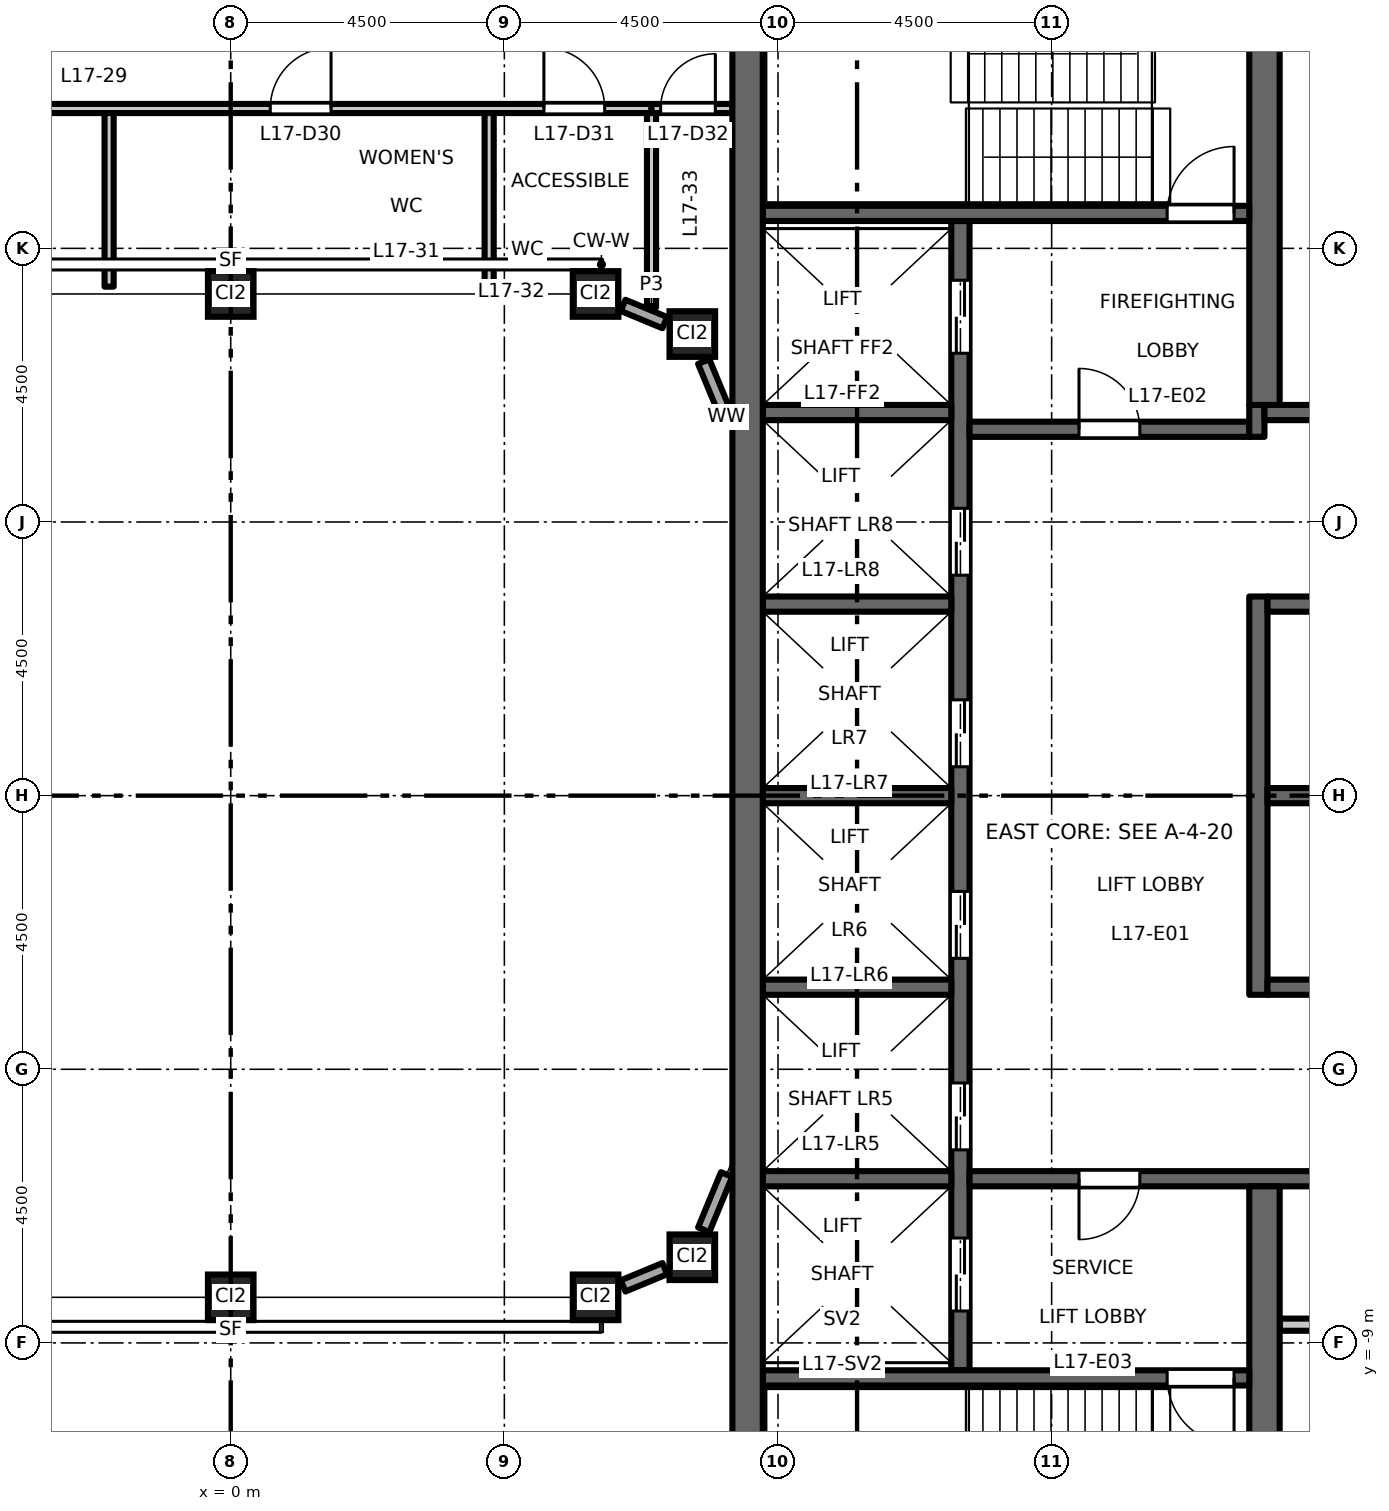
"""IFC4 building model, lengths in metres.
Left out: names, types, materials, properties, quantities, classifications, styles, units other than length and angle.
Written with IfcOpenShell. Run it as: python <this file> out.ifc"""

import sys

from ifc_helpers import new_model, si_unit, direction, frame, frame_2d, origin, origin_2d, place, context, subcontext, project, spatial, rectangle, hollow_rectangle, extrude, element, fill, save


model = new_model("IFC4")
c1 = context("Model", 3, precision=1e-05, world=origin(), true_north=direction((0.0, 1.0)))
c2 = subcontext(c1, "Body", "Model", "MODEL_VIEW")
j1 = project(units=[si_unit("LENGTHUNIT", "METRE"), si_unit("PLANEANGLEUNIT", "RADIAN")], contexts=[c1])
p1 = place(None, origin())
s1 = spatial("IfcSite", under=j1, at=p1, CompositionType="ELEMENT")
p2 = place(p1, origin())
s2 = spatial("IfcBuilding", under=s1, at=p2, CompositionType="ELEMENT")
p3 = place(p2, frame((0.0, 0.0, 80.7)))
s3 = spatial("IfcBuildingStorey", under=s2, at=p3, CompositionType="ELEMENT", Elevation=80.7)
for number, where, z_axis, x_axis in (
    (1, (0.0, -8.25, 0.0), (0.0, 0.0, 1.0), (1.0, 0.0, 0.0)),
    (2, (6.0, -8.25, 0.0), (0.0, 0.0, 1.0), (1.0, 0.0, 0.0)),
    (3, (7.591, -7.591, 0.0), (0.0, 0.0, 1.0), (1.0, 0.0, 0.0)),
    (4, (0.0, 8.25, 0.0), (0.0, 0.0, 1.0), (1.0, 0.0, 0.0)),
    (5, (6.0, 8.25, 0.0), (0.0, 0.0, 1.0), (1.0, 0.0, 0.0)),
    (6, (7.591, 7.591, 0.0), (0.0, 0.0, 1.0), (1.0, 0.0, 0.0)),
):
    element("IfcColumn", number, at=place(p3, frame(where, z_axis=z_axis, x_axis=x_axis)), inside=s3, PredefinedType="COLUMN", context=c2, shape_type="SweptSolid", body=[
        extrude(hollow_rectangle(XDim=0.75, YDim=0.75, WallThickness=0.045, at=origin_2d()), origin(), (0.0, 0.0, 1.0), 4.5),
    ])
p4 = place(p3, frame((12.0, -9.45, 0.0), z_axis=(0.0, 0.0, 1.0), x_axis=(0.0, 1.0, 0.0)))
e7 = element("IfcWall", 7, at=p4, inside=s3, PredefinedType="SHEAR", context=c2, shape_type="SweptSolid", body=[
    extrude(rectangle(XDim=18.9, YDim=0.3, at=frame_2d((9.45, 0.0))), origin(), (0.0, 0.0, 1.0), 4.35),
])
p5 = place(p4, frame((3.625, 0.0, 0.0)))
e8 = element("IfcOpeningElement", 8, at=p5, cuts=e7, PredefinedType="OPENING", context=c2, shape_type="SweptSolid", body=[
    extrude(rectangle(XDim=1.1, YDim=2.1, at=frame_2d((0.55, 1.05))), frame((0.0, 0.16, 0.0), z_axis=(0.0, -1.0, 0.0), x_axis=(1.0, 0.0, 0.0)), (0.0, 0.0, 1.0), 0.32),
])
p6 = place(p4, frame((6.775, 0.0, 0.0)))
e9 = element("IfcOpeningElement", 9, at=p6, cuts=e7, PredefinedType="OPENING", context=c2, shape_type="SweptSolid", body=[
    extrude(rectangle(XDim=1.1, YDim=2.1, at=frame_2d((0.55, 1.05))), frame((0.0, 0.16, 0.0), z_axis=(0.0, -1.0, 0.0), x_axis=(1.0, 0.0, 0.0)), (0.0, 0.0, 1.0), 0.32),
])
p7 = place(p4, frame((9.925, 0.0, 0.0)))
e10 = element("IfcOpeningElement", 10, at=p7, cuts=e7, PredefinedType="OPENING", context=c2, shape_type="SweptSolid", body=[
    extrude(rectangle(XDim=1.1, YDim=2.1, at=frame_2d((0.55, 1.05))), frame((0.0, 0.16, 0.0), z_axis=(0.0, -1.0, 0.0), x_axis=(1.0, 0.0, 0.0)), (0.0, 0.0, 1.0), 0.32),
])
p8 = place(p4, frame((13.075, 0.0, 0.0)))
e11 = element("IfcOpeningElement", 11, at=p8, cuts=e7, PredefinedType="OPENING", context=c2, shape_type="SweptSolid", body=[
    extrude(rectangle(XDim=1.1, YDim=2.1, at=frame_2d((0.55, 1.05))), frame((0.0, 0.16, 0.0), z_axis=(0.0, -1.0, 0.0), x_axis=(1.0, 0.0, 0.0)), (0.0, 0.0, 1.0), 0.32),
])
p9 = place(p4, frame((16.725, 0.0, 0.0)))
e12 = element("IfcOpeningElement", 12, at=p9, cuts=e7, PredefinedType="OPENING", context=c2, shape_type="SweptSolid", body=[
    extrude(rectangle(XDim=1.2, YDim=2.1, at=frame_2d((0.6, 1.05))), frame((0.0, 0.16, 0.0), z_axis=(0.0, -1.0, 0.0), x_axis=(1.0, 0.0, 0.0)), (0.0, 0.0, 1.0), 0.32),
])
p10 = place(p4, frame((0.975, 0.0, 0.0)))
e13 = element("IfcOpeningElement", 13, at=p10, cuts=e7, PredefinedType="OPENING", context=c2, shape_type="SweptSolid", body=[
    extrude(rectangle(XDim=1.2, YDim=2.1, at=frame_2d((0.6, 1.05))), frame((0.0, 0.16, 0.0), z_axis=(0.0, -1.0, 0.0), x_axis=(1.0, 0.0, 0.0)), (0.0, 0.0, 1.0), 0.32),
])
p11 = place(p3, frame((12.15, 6.025, 0.0), z_axis=(0.0, 0.0, 1.0), x_axis=(1.0, 0.0, 0.0)))
e14 = element("IfcWall", 14, at=p11, inside=s3, PredefinedType="SHEAR", context=c2, shape_type="SweptSolid", body=[
    extrude(rectangle(XDim=4.6, YDim=0.25, at=frame_2d((2.3, 0.0))), origin(), (0.0, 0.0, 1.0), 4.35),
])
p12 = place(p11, frame((1.8, 0.0, 0.0)))
e15 = element("IfcOpeningElement", 15, at=p12, cuts=e14, PredefinedType="OPENING", context=c2, shape_type="SweptSolid", body=[
    extrude(rectangle(XDim=1.0, YDim=2.1, at=frame_2d((0.5, 1.05))), frame((0.0, 0.135, 0.0), z_axis=(0.0, -1.0, 0.0), x_axis=(1.0, 0.0, 0.0)), (0.0, 0.0, 1.0), 0.27),
])
p13 = place(p3, frame((16.875, 5.9, 0.0), z_axis=(0.0, 0.0, 1.0), x_axis=(0.0, 1.0, 0.0)))
e16 = element("IfcWall", 16, at=p13, inside=s3, PredefinedType="SHEAR", context=c2, shape_type="SweptSolid", body=[
    extrude(rectangle(XDim=0.525, YDim=0.25, at=frame_2d((0.263, 0.0))), origin(), (0.0, 0.0, 1.0), 4.35),
])
p14 = place(p3, frame((17.0, 6.3, 0.0), z_axis=(0.0, 0.0, 1.0), x_axis=(1.0, 0.0, 0.0)))
e17 = element("IfcWall", 17, at=p14, inside=s3, PredefinedType="SHEAR", context=c2, shape_type="SweptSolid", body=[
    extrude(rectangle(XDim=4.25, YDim=0.25, at=frame_2d((2.125, 0.0))), origin(), (0.0, 0.0, 1.0), 4.35),
])
p15 = place(p3, frame((12.15, -6.3, 0.0), z_axis=(0.0, 0.0, 1.0), x_axis=(1.0, 0.0, 0.0)))
e18 = element("IfcWall", 18, at=p15, inside=s3, PredefinedType="SHEAR", context=c2, shape_type="SweptSolid", body=[
    extrude(rectangle(XDim=9.1, YDim=0.25, at=frame_2d((4.55, 0.0))), origin(), (0.0, 0.0, 1.0), 4.35),
])
p16 = place(p15, frame((1.8, 0.0, 0.0)))
e19 = element("IfcOpeningElement", 19, at=p16, cuts=e18, PredefinedType="OPENING", context=c2, shape_type="SweptSolid", body=[
    extrude(rectangle(XDim=1.0, YDim=2.1, at=frame_2d((0.5, 1.05))), frame((0.0, 0.135, 0.0), z_axis=(0.0, -1.0, 0.0), x_axis=(1.0, 0.0, 0.0)), (0.0, 0.0, 1.0), 0.27),
])
p17 = place(p15, frame((6.15, 0.0, 0.0)))
e20 = element("IfcOpeningElement", 20, at=p17, cuts=e18, PredefinedType="OPENING", context=c2, shape_type="SweptSolid", body=[
    extrude(rectangle(XDim=0.9, YDim=2.1, at=frame_2d((0.45, 1.05))), frame((0.0, 0.135, 0.0), z_axis=(0.0, -1.0, 0.0), x_axis=(1.0, 0.0, 0.0)), (0.0, 0.0, 1.0), 0.27),
])
p18 = place(p3, frame((17.25, -8.7, 0.0), z_axis=(0.0, 0.0, 1.0), x_axis=(1.0, 0.0, 0.0)))
e21 = element("IfcWall", 21, at=p18, inside=s3, PredefinedType="PARTITIONING", context=c2, shape_type="SweptSolid", body=[
    extrude(rectangle(XDim=4.0, YDim=0.2, at=frame_2d((2.0, 0.0))), origin(), (0.0, 0.0, 1.0), 4.35),
])
p19 = place(p3, frame((16.9, -3.275, 0.0), z_axis=(0.0, 0.0, 1.0), x_axis=(0.0, 1.0, 0.0)))
e22 = element("IfcWall", 22, at=p19, inside=s3, PredefinedType="SHEAR", context=c2, shape_type="SweptSolid", body=[
    extrude(rectangle(XDim=6.55, YDim=0.3, at=frame_2d((3.275, 0.0))), origin(), (0.0, 0.0, 1.0), 4.35),
])
for number, where, z_axis, x_axis in (
    (23, (17.05, 0.0, 0.0), (0.0, 0.0, 1.0), (1.0, 0.0, 0.0)),
    (24, (17.05, 3.15, 0.0), (0.0, 0.0, 1.0), (1.0, 0.0, 0.0)),
    (25, (17.05, -3.15, 0.0), (0.0, 0.0, 1.0), (1.0, 0.0, 0.0)),
):
    element("IfcWall", number, at=place(p3, frame(where, z_axis=z_axis, x_axis=x_axis)), inside=s3, PredefinedType="SHEAR", context=c2, shape_type="SweptSolid", body=[
        extrude(rectangle(XDim=4.2, YDim=0.25, at=frame_2d((2.1, 0.0))), origin(), (0.0, 0.0, 1.0), 4.35),
    ])
for number, where, z_axis, x_axis in (
    (26, (17.0, 6.425, 0.0), (0.0, 0.0, 1.0), (0.0, 1.0, 0.0)),
    (27, (17.0, -13.0, 0.0), (0.0, 0.0, 1.0), (0.0, 1.0, 0.0)),
):
    element("IfcWall", number, at=place(p3, frame(where, z_axis=z_axis, x_axis=x_axis)), inside=s3, PredefinedType="SHEAR", context=c2, shape_type="SweptSolid", body=[
        extrude(rectangle(XDim=6.575, YDim=0.5, at=frame_2d((3.288, 0.0))), origin(), (0.0, 0.0, 1.0), 4.35),
    ])
for number, where, z_axis, x_axis in (
    (28, (8.75, 0.0, 0.0), (0.0, 0.0, 1.0), (1.0, 0.0, 0.0)),
    (29, (8.75, 3.15, 0.0), (0.0, 0.0, 1.0), (1.0, 0.0, 0.0)),
    (30, (8.75, 6.3, 0.0), (0.0, 0.0, 1.0), (1.0, 0.0, 0.0)),
    (31, (8.75, -3.15, 0.0), (0.0, 0.0, 1.0), (1.0, 0.0, 0.0)),
    (32, (8.75, -6.3, 0.0), (0.0, 0.0, 1.0), (1.0, 0.0, 0.0)),
):
    element("IfcWall", number, at=place(p3, frame(where, z_axis=z_axis, x_axis=x_axis)), inside=s3, PredefinedType="SHEAR", context=c2, shape_type="SweptSolid", body=[
        extrude(rectangle(XDim=3.1, YDim=0.25, at=frame_2d((1.55, 0.0))), origin(), (0.0, 0.0, 1.0), 4.35),
    ])
p20 = place(p3, frame((8.75, 9.575, 0.0), z_axis=(0.0, 0.0, 1.0), x_axis=(1.0, 0.0, 0.0)))
e33 = element("IfcWall", 33, at=p20, inside=s3, PredefinedType="SHEAR", context=c2, shape_type="SweptSolid", body=[
    extrude(rectangle(XDim=8.0, YDim=0.25, at=frame_2d((4.0, 0.0))), origin(), (0.0, 0.0, 1.0), 4.35),
])
p21 = place(p20, frame((6.65, 0.0, 0.0)))
e34 = element("IfcOpeningElement", 34, at=p21, cuts=e33, PredefinedType="OPENING", context=c2, shape_type="SweptSolid", body=[
    extrude(rectangle(XDim=1.1, YDim=2.1, at=frame_2d((0.55, 1.05))), frame((0.0, 0.135, 0.0), z_axis=(0.0, -1.0, 0.0), x_axis=(1.0, 0.0, 0.0)), (0.0, 0.0, 1.0), 0.27),
])
p22 = place(p3, frame((8.75, -9.575, 0.0), z_axis=(0.0, 0.0, 1.0), x_axis=(1.0, 0.0, 0.0)))
e35 = element("IfcWall", 35, at=p22, inside=s3, PredefinedType="SHEAR", context=c2, shape_type="SweptSolid", body=[
    extrude(rectangle(XDim=8.0, YDim=0.25, at=frame_2d((4.0, 0.0))), origin(), (0.0, 0.0, 1.0), 4.35),
])
p23 = place(p22, frame((6.65, 0.0, 0.0)))
e36 = element("IfcOpeningElement", 36, at=p23, cuts=e35, PredefinedType="OPENING", context=c2, shape_type="SweptSolid", body=[
    extrude(rectangle(XDim=1.1, YDim=2.1, at=frame_2d((0.55, 1.05))), frame((0.0, 0.135, 0.0), z_axis=(0.0, -1.0, 0.0), x_axis=(1.0, 0.0, 0.0)), (0.0, 0.0, 1.0), 0.27),
])
p24 = place(p3, frame((8.5, -13.0, 0.0), z_axis=(0.0, 0.0, 1.0), x_axis=(0.0, 1.0, 0.0)))
e37 = element("IfcWall", 37, at=p24, inside=s3, PredefinedType="SHEAR", context=c2, shape_type="SweptSolid", body=[
    extrude(rectangle(XDim=26.0, YDim=0.5, at=frame_2d((13.0, 0.0))), origin(), (0.0, 0.0, 1.0), 4.35),
])
p25 = place(p3, frame((6.453, -8.062, 0.0), z_axis=(0.0, 0.0, 1.0), x_axis=(0.923940677943, 0.382535780864, 0.0)))
e38 = element("IfcWall", 38, at=p25, inside=s3, PredefinedType="STANDARD", context=c2, shape_type="SweptSolid", body=[
    extrude(rectangle(XDim=0.742, YDim=0.2, at=frame_2d((0.371, 0.0))), origin(), (0.0, 0.0, 1.0), 3.73),
])
for number, where, z_axis, x_axis in (
    (39, (7.779, -7.138, 0.0), (0.0, 0.0, 1.0), (0.383, 0.924, 0.0)),
    (40, (8.154, 6.231, 0.0), (0.0, 0.0, 1.0), (-0.383, 0.924, 0.0)),
):
    element("IfcWall", number, at=place(p3, frame(where, z_axis=z_axis, x_axis=x_axis)), inside=s3, PredefinedType="STANDARD", context=c2, shape_type="SweptSolid", body=[
        extrude(rectangle(XDim=0.982, YDim=0.2, at=frame_2d((0.491, 0.0))), origin(), (0.0, 0.0, 1.0), 3.73),
    ])
p26 = place(p3, frame((7.138, 7.779, 0.0), z_axis=(0.0, 0.0, 1.0), x_axis=(-0.923940677943, 0.382535780864, 0.0)))
e41 = element("IfcWall", 41, at=p26, inside=s3, PredefinedType="STANDARD", context=c2, shape_type="SweptSolid", body=[
    extrude(rectangle(XDim=0.742, YDim=0.2, at=frame_2d((0.371, 0.0))), origin(), (0.0, 0.0, 1.0), 3.73),
])
p27 = place(p3, frame((-8.25, 11.3, 0.0), z_axis=(0.0, 0.0, 1.0), x_axis=(1.0, 0.0, 0.0)))
e42 = element("IfcWall", 42, at=p27, inside=s3, PredefinedType="PARTITIONING", context=c2, shape_type="SweptSolid", body=[
    extrude(rectangle(XDim=15.17, YDim=0.15, at=frame_2d((7.585, 0.0))), origin(), (0.0, 0.0, 1.0), 4.35),
])
p28 = place(p27, frame((2.65, 0.0, 0.0)))
e43 = element("IfcOpeningElement", 43, at=p28, cuts=e42, PredefinedType="OPENING", context=c2, shape_type="SweptSolid", body=[
    extrude(rectangle(XDim=1.0, YDim=2.1, at=frame_2d((0.5, 1.05))), frame((0.0, 0.085, 0.0), z_axis=(0.0, -1.0, 0.0), x_axis=(1.0, 0.0, 0.0)), (0.0, 0.0, 1.0), 0.17),
])
p29 = place(p27, frame((8.9, 0.0, 0.0)))
e44 = element("IfcOpeningElement", 44, at=p29, cuts=e42, PredefinedType="OPENING", context=c2, shape_type="SweptSolid", body=[
    extrude(rectangle(XDim=1.0, YDim=2.1, at=frame_2d((0.5, 1.05))), frame((0.0, 0.085, 0.0), z_axis=(0.0, -1.0, 0.0), x_axis=(1.0, 0.0, 0.0)), (0.0, 0.0, 1.0), 0.17),
])
p30 = place(p27, frame((13.4, 0.0, 0.0)))
e45 = element("IfcOpeningElement", 45, at=p30, cuts=e42, PredefinedType="OPENING", context=c2, shape_type="SweptSolid", body=[
    extrude(rectangle(XDim=1.0, YDim=2.1, at=frame_2d((0.5, 1.05))), frame((0.0, 0.085, 0.0), z_axis=(0.0, -1.0, 0.0), x_axis=(1.0, 0.0, 0.0)), (0.0, 0.0, 1.0), 0.17),
])
p31 = place(p3, frame((6.92, 11.3, 0.0), z_axis=(0.0, 0.0, 1.0), x_axis=(1.0, 0.0, 0.0)))
e46 = element("IfcWall", 46, at=p31, inside=s3, PredefinedType="PARTITIONING", context=c2, shape_type="SweptSolid", body=[
    extrude(rectangle(XDim=1.33, YDim=0.15, at=frame_2d((0.665, 0.0))), origin(), (0.0, 0.0, 1.0), 4.35),
])
p32 = place(p31, frame((0.15, 0.0, 0.0)))
e47 = element("IfcOpeningElement", 47, at=p32, cuts=e46, PredefinedType="OPENING", context=c2, shape_type="SweptSolid", body=[
    extrude(rectangle(XDim=0.9, YDim=2.1, at=frame_2d((0.45, 1.05))), frame((0.0, 0.085, 0.0), z_axis=(0.0, -1.0, 0.0), x_axis=(1.0, 0.0, 0.0)), (0.0, 0.0, 1.0), 0.17),
])
for number, where, z_axis, x_axis in (
    (48, (-2.0, 8.37, 0.0), (0.0, 0.0, 1.0), (0.0, 1.0, 0.0)),
    (49, (4.25, 8.37, 0.0), (0.0, 0.0, 1.0), (0.0, 1.0, 0.0)),
):
    element("IfcWall", number, at=place(p3, frame(where, z_axis=z_axis, x_axis=x_axis)), inside=s3, PredefinedType="PARTITIONING", context=c2, shape_type="SweptSolid", body=[
        extrude(rectangle(XDim=2.855, YDim=0.15, at=frame_2d((1.427, 0.0))), origin(), (0.0, 0.0, 1.0), 4.35),
    ])
p33 = place(p3, frame((6.92, 8.028, 0.0), z_axis=(0.0, 0.0, 1.0), x_axis=(0.0, 1.0, 0.0)))
e50 = element("IfcWall", 50, at=p33, inside=s3, PredefinedType="PARTITIONING", context=c2, shape_type="SweptSolid", body=[
    extrude(rectangle(XDim=3.197, YDim=0.15, at=frame_2d((1.599, 0.0))), origin(), (0.0, 0.0, 1.0), 4.35),
])
p34 = place(p12, origin())
e51 = element("IfcDoor", 51, at=p34, inside=s3, OperationType="SINGLE_SWING_RIGHT", PredefinedType="DOOR", context=c2, shape_type="SweptSolid", body=[
    extrude(rectangle(XDim=1.0, YDim=2.1, at=frame_2d((0.5, 1.05))), frame((0.0, 0.025, 0.0), z_axis=(0.0, -1.0, 0.0), x_axis=(1.0, 0.0, 0.0)), (0.0, 0.0, 1.0), 0.05),
])
fill(e15, e51)
p35 = place(p16, origin())
e52 = element("IfcDoor", 52, at=p35, inside=s3, OperationType="SINGLE_SWING_LEFT", PredefinedType="DOOR", context=c2, shape_type="SweptSolid", body=[
    extrude(rectangle(XDim=1.0, YDim=2.1, at=frame_2d((0.5, 1.05))), frame((0.0, 0.025, 0.0), z_axis=(0.0, -1.0, 0.0), x_axis=(1.0, 0.0, 0.0)), (0.0, 0.0, 1.0), 0.05),
])
fill(e19, e52)
p36 = place(p21, origin())
e53 = element("IfcDoor", 53, at=p36, inside=s3, OperationType="SINGLE_SWING_LEFT", PredefinedType="DOOR", context=c2, shape_type="SweptSolid", body=[
    extrude(rectangle(XDim=1.1, YDim=2.1, at=frame_2d((0.55, 1.05))), frame((0.0, 0.025, 0.0), z_axis=(0.0, -1.0, 0.0), x_axis=(1.0, 0.0, 0.0)), (0.0, 0.0, 1.0), 0.05),
])
fill(e34, e53)
p37 = place(p23, origin())
e54 = element("IfcDoor", 54, at=p37, inside=s3, OperationType="SINGLE_SWING_RIGHT", PredefinedType="DOOR", context=c2, shape_type="SweptSolid", body=[
    extrude(rectangle(XDim=1.1, YDim=2.1, at=frame_2d((0.55, 1.05))), frame((0.0, 0.025, 0.0), z_axis=(0.0, -1.0, 0.0), x_axis=(1.0, 0.0, 0.0)), (0.0, 0.0, 1.0), 0.05),
])
fill(e36, e54)
p38 = place(p5, origin())
e55 = element("IfcDoor", 55, at=p38, inside=s3, OperationType="DOUBLE_DOOR_SLIDING", PredefinedType="DOOR", context=c2, shape_type="SweptSolid", body=[
    extrude(rectangle(XDim=1.1, YDim=2.1, at=frame_2d((0.55, 1.05))), frame((0.0, 0.025, 0.0), z_axis=(0.0, -1.0, 0.0), x_axis=(1.0, 0.0, 0.0)), (0.0, 0.0, 1.0), 0.05),
])
fill(e8, e55)
p39 = place(p6, origin())
e56 = element("IfcDoor", 56, at=p39, inside=s3, OperationType="DOUBLE_DOOR_SLIDING", PredefinedType="DOOR", context=c2, shape_type="SweptSolid", body=[
    extrude(rectangle(XDim=1.1, YDim=2.1, at=frame_2d((0.55, 1.05))), frame((0.0, 0.025, 0.0), z_axis=(0.0, -1.0, 0.0), x_axis=(1.0, 0.0, 0.0)), (0.0, 0.0, 1.0), 0.05),
])
fill(e9, e56)
p40 = place(p7, origin())
e57 = element("IfcDoor", 57, at=p40, inside=s3, OperationType="DOUBLE_DOOR_SLIDING", PredefinedType="DOOR", context=c2, shape_type="SweptSolid", body=[
    extrude(rectangle(XDim=1.1, YDim=2.1, at=frame_2d((0.55, 1.05))), frame((0.0, 0.025, 0.0), z_axis=(0.0, -1.0, 0.0), x_axis=(1.0, 0.0, 0.0)), (0.0, 0.0, 1.0), 0.05),
])
fill(e10, e57)
p41 = place(p8, origin())
e58 = element("IfcDoor", 58, at=p41, inside=s3, OperationType="DOUBLE_DOOR_SLIDING", PredefinedType="DOOR", context=c2, shape_type="SweptSolid", body=[
    extrude(rectangle(XDim=1.1, YDim=2.1, at=frame_2d((0.55, 1.05))), frame((0.0, 0.025, 0.0), z_axis=(0.0, -1.0, 0.0), x_axis=(1.0, 0.0, 0.0)), (0.0, 0.0, 1.0), 0.05),
])
fill(e11, e58)
p42 = place(p9, origin())
e59 = element("IfcDoor", 59, at=p42, inside=s3, OperationType="DOUBLE_DOOR_SLIDING", PredefinedType="DOOR", context=c2, shape_type="SweptSolid", body=[
    extrude(rectangle(XDim=1.2, YDim=2.1, at=frame_2d((0.6, 1.05))), frame((0.0, 0.025, 0.0), z_axis=(0.0, -1.0, 0.0), x_axis=(1.0, 0.0, 0.0)), (0.0, 0.0, 1.0), 0.05),
])
fill(e12, e59)
p43 = place(p10, origin())
e60 = element("IfcDoor", 60, at=p43, inside=s3, OperationType="DOUBLE_DOOR_SLIDING", PredefinedType="DOOR", context=c2, shape_type="SweptSolid", body=[
    extrude(rectangle(XDim=1.2, YDim=2.1, at=frame_2d((0.6, 1.05))), frame((0.0, 0.025, 0.0), z_axis=(0.0, -1.0, 0.0), x_axis=(1.0, 0.0, 0.0)), (0.0, 0.0, 1.0), 0.05),
])
fill(e13, e60)
p44 = place(p29, origin())
e61 = element("IfcDoor", 61, at=p44, inside=s3, OperationType="SINGLE_SWING_RIGHT", PredefinedType="DOOR", context=c2, shape_type="SweptSolid", body=[
    extrude(rectangle(XDim=1.0, YDim=2.1, at=frame_2d((0.5, 1.05))), frame((0.0, 0.025, 0.0), z_axis=(0.0, -1.0, 0.0), x_axis=(1.0, 0.0, 0.0)), (0.0, 0.0, 1.0), 0.05),
])
fill(e44, e61)
p45 = place(p30, origin())
e62 = element("IfcDoor", 62, at=p45, inside=s3, OperationType="SINGLE_SWING_LEFT", PredefinedType="DOOR", context=c2, shape_type="SweptSolid", body=[
    extrude(rectangle(XDim=1.0, YDim=2.1, at=frame_2d((0.5, 1.05))), frame((0.0, 0.025, 0.0), z_axis=(0.0, -1.0, 0.0), x_axis=(1.0, 0.0, 0.0)), (0.0, 0.0, 1.0), 0.05),
])
fill(e45, e62)
p46 = place(p32, origin())
e63 = element("IfcDoor", 63, at=p46, inside=s3, OperationType="SINGLE_SWING_RIGHT", PredefinedType="DOOR", context=c2, shape_type="SweptSolid", body=[
    extrude(rectangle(XDim=0.9, YDim=2.1, at=frame_2d((0.45, 1.05))), frame((0.0, 0.025, 0.0), z_axis=(0.0, -1.0, 0.0), x_axis=(1.0, 0.0, 0.0)), (0.0, 0.0, 1.0), 0.05),
])
fill(e47, e63)
save(model, sys.argv[1])
